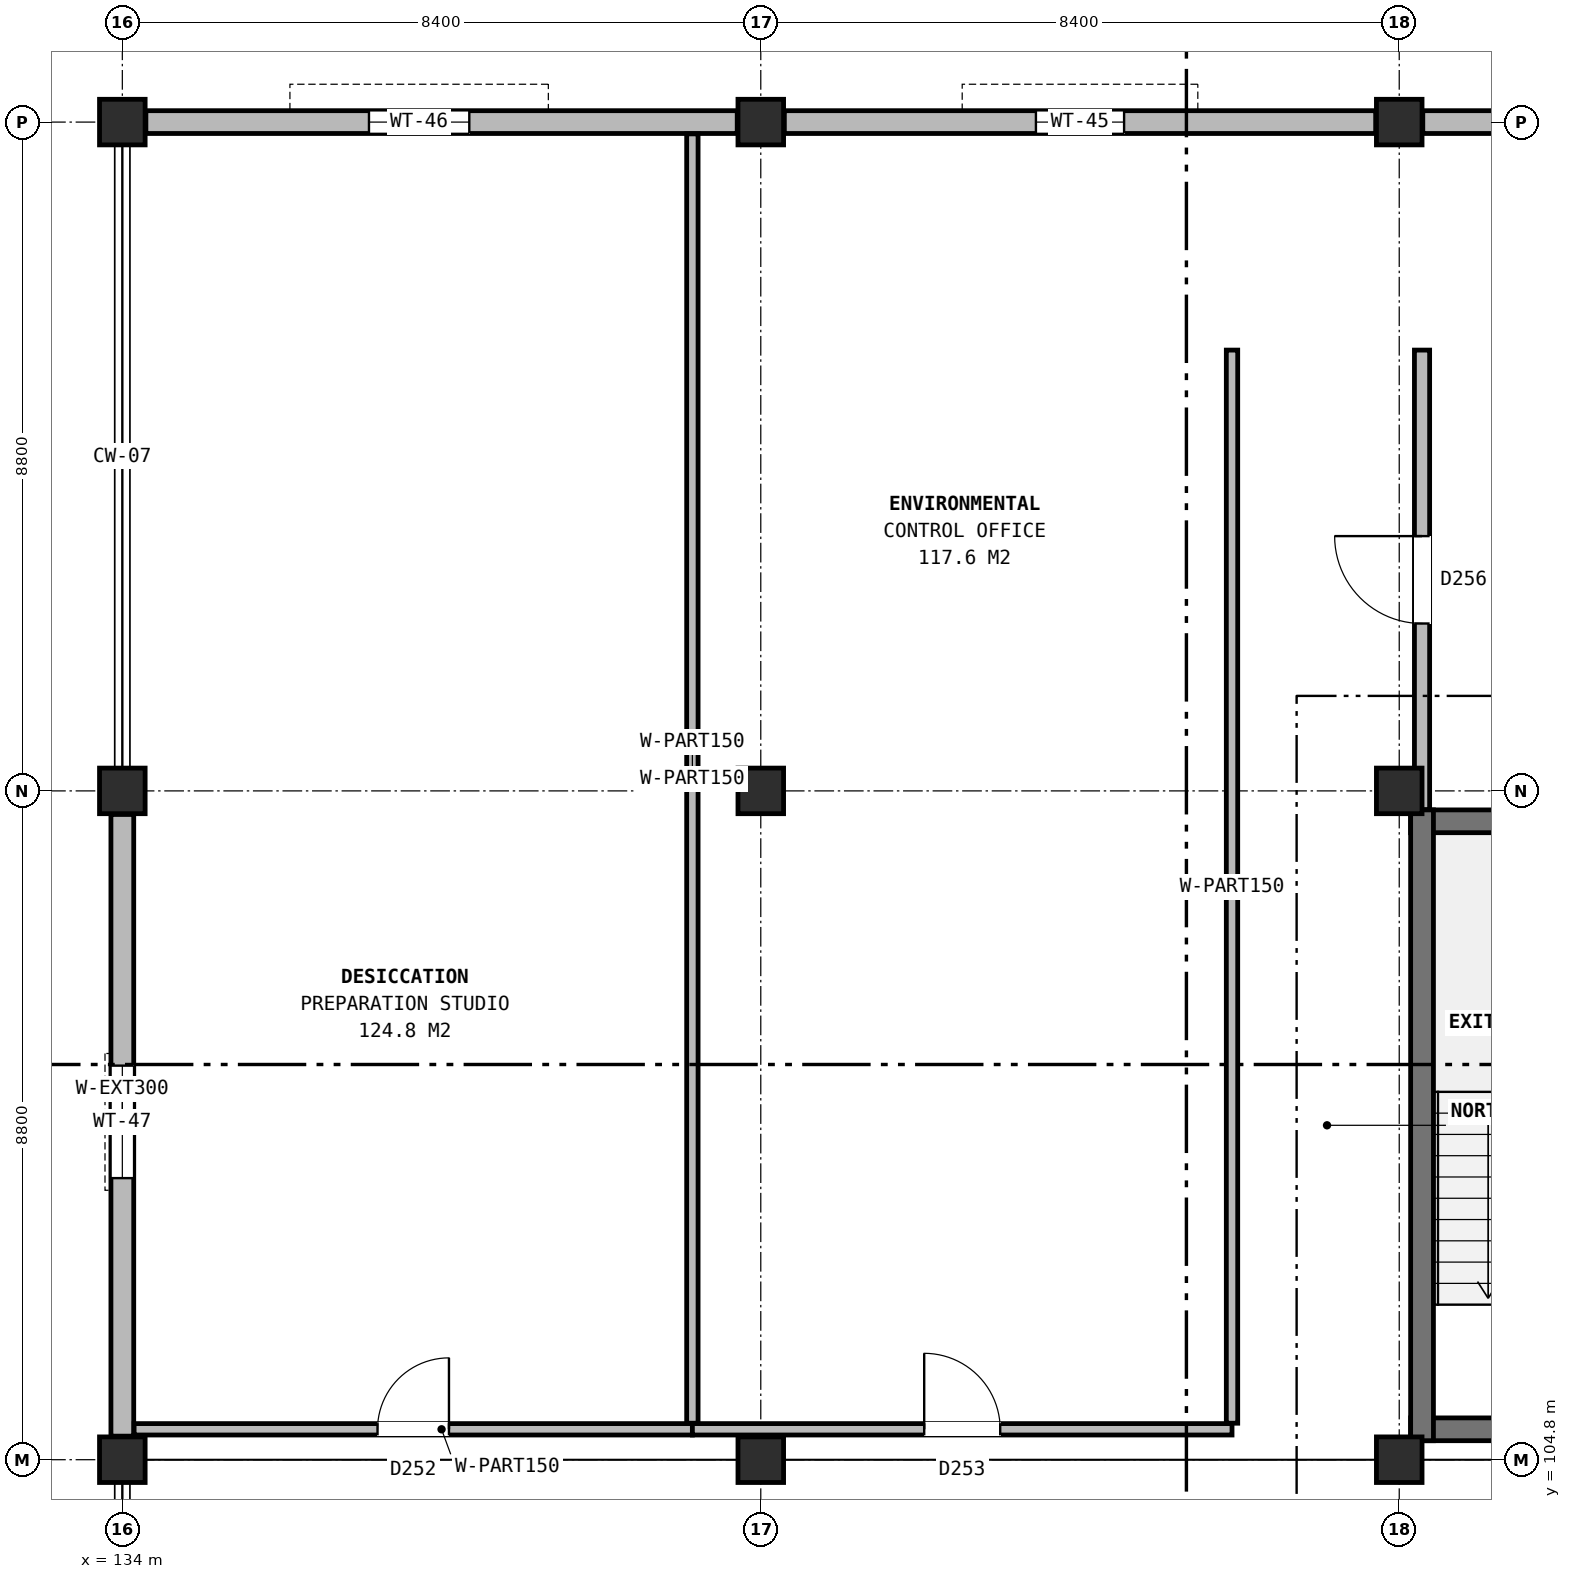
"""IFC4 building model, lengths in metres.
Left out: names, types, materials, properties, quantities, classifications, styles, units other than length and angle.
Written with IfcOpenShell. Run it as: python <this file> out.ifc"""

import sys

from ifc_helpers import new_model, si_unit, direction, frame, frame_2d, origin, origin_2d, place, context, subcontext, project, spatial, rectangle, extrude, element, fill, save


model = new_model("IFC4")
c1 = context("Model", 3, precision=1e-05, world=origin(), true_north=direction((0.0, 1.0)))
c2 = subcontext(c1, "Body", "Model", "MODEL_VIEW")
j1 = project(units=[si_unit("LENGTHUNIT", "METRE"), si_unit("PLANEANGLEUNIT", "RADIAN")], contexts=[c1])
p1 = place(None, origin())
s1 = spatial("IfcSite", under=j1, at=p1, CompositionType="ELEMENT")
p2 = place(p1, origin())
s2 = spatial("IfcBuilding", under=s1, at=p2, CompositionType="ELEMENT")
p3 = place(p2, frame((0.0, 0.0, 44.4)))
s3 = spatial("IfcBuildingStorey", under=s2, at=p3, CompositionType="ELEMENT", Elevation=44.4)
for number, where, z_axis, x_axis in (
    (1, (134.0, 104.8, 0.0), (0.0, 0.0, 1.0), (1.0, 0.0, 0.0)),
    (2, (134.0, 113.6, 0.0), (0.0, 0.0, 1.0), (1.0, 0.0, 0.0)),
    (3, (134.0, 122.4, 0.0), (0.0, 0.0, 1.0), (1.0, 0.0, 0.0)),
    (4, (142.4, 104.8, 0.0), (0.0, 0.0, 1.0), (1.0, 0.0, 0.0)),
    (5, (142.4, 113.6, 0.0), (0.0, 0.0, 1.0), (1.0, 0.0, 0.0)),
    (6, (142.4, 122.4, 0.0), (0.0, 0.0, 1.0), (1.0, 0.0, 0.0)),
    (7, (150.8, 104.8, 0.0), (0.0, 0.0, 1.0), (1.0, 0.0, 0.0)),
    (8, (150.8, 113.6, 0.0), (0.0, 0.0, 1.0), (1.0, 0.0, 0.0)),
    (9, (150.8, 122.4, 0.0), (0.0, 0.0, 1.0), (1.0, 0.0, 0.0)),
):
    element("IfcColumn", number, at=place(p3, frame(where, z_axis=z_axis, x_axis=x_axis)), inside=s3, PredefinedType="COLUMN", context=c2, shape_type="SweptSolid", body=[
        extrude(rectangle(XDim=0.6, YDim=0.6, at=origin_2d()), origin(), (0.0, 0.0, 1.0), 3.8),
    ])
p4 = place(p3, frame((158.89, 122.4, 0.0), z_axis=(0.0, 0.0, 1.0), x_axis=(-1.0, 0.0, 0.0)))
e10 = element("IfcWall", 10, at=p4, inside=s3, PredefinedType="SOLIDWALL", context=c2, shape_type="SweptSolid", body=[
    extrude(rectangle(XDim=7.78, YDim=0.3, at=frame_2d((3.89, 0.0))), origin(), (0.0, 0.0, 1.0), 3.05),
])
p5 = place(p4, frame((2.59, 0.0, 0.9)))
e11 = element("IfcOpeningElement", 11, at=p5, cuts=e10, PredefinedType="OPENING", context=c2, shape_type="SweptSolid", body=[
    extrude(rectangle(XDim=2.6, YDim=2.0, at=frame_2d((1.3, 1.0))), frame((0.0, 0.16, 0.0), z_axis=(0.0, -1.0, 0.0), x_axis=(1.0, 0.0, 0.0)), (0.0, 0.0, 1.0), 0.32),
])
p6 = place(p3, frame((150.49, 122.4, 0.0), z_axis=(0.0, 0.0, 1.0), x_axis=(-1.0, 0.0, 0.0)))
e12 = element("IfcWall", 12, at=p6, inside=s3, PredefinedType="SOLIDWALL", context=c2, shape_type="SweptSolid", body=[
    extrude(rectangle(XDim=7.78, YDim=0.3, at=frame_2d((3.89, 0.0))), origin(), (0.0, 0.0, 1.0), 3.05),
])
p7 = place(p6, frame((3.31, 0.0, 0.9)))
e13 = element("IfcOpeningElement", 13, at=p7, cuts=e12, PredefinedType="OPENING", context=c2, shape_type="SweptSolid", body=[
    extrude(rectangle(XDim=1.16, YDim=1.74, at=frame_2d((0.58, 0.87))), frame((0.0, 0.16, 0.0), z_axis=(0.0, -1.0, 0.0), x_axis=(1.0, 0.0, 0.0)), (0.0, 0.0, 1.0), 0.32),
])
p8 = place(p3, frame((142.09, 122.4, 0.0), z_axis=(0.0, 0.0, 1.0), x_axis=(-1.0, 0.0, 0.0)))
e14 = element("IfcWall", 14, at=p8, inside=s3, PredefinedType="SOLIDWALL", context=c2, shape_type="SweptSolid", body=[
    extrude(rectangle(XDim=7.78, YDim=0.3, at=frame_2d((3.89, 0.0))), origin(), (0.0, 0.0, 1.0), 3.05),
])
p9 = place(p8, frame((3.525, 0.0, 0.9)))
e15 = element("IfcOpeningElement", 15, at=p9, cuts=e14, PredefinedType="OPENING", context=c2, shape_type="SweptSolid", body=[
    extrude(rectangle(XDim=1.32, YDim=1.78, at=frame_2d((0.66, 0.89))), frame((0.0, 0.16, 0.0), z_axis=(0.0, -1.0, 0.0), x_axis=(1.0, 0.0, 0.0)), (0.0, 0.0, 1.0), 0.32),
])
p10 = place(p3, frame((134.0, 113.29, 0.0), z_axis=(0.0, 0.0, 1.0), x_axis=(0.0, -1.0, 0.0)))
e16 = element("IfcWall", 16, at=p10, inside=s3, PredefinedType="SOLIDWALL", context=c2, shape_type="SweptSolid", body=[
    extrude(rectangle(XDim=8.18, YDim=0.3, at=frame_2d((4.09, 0.0))), origin(), (0.0, 0.0, 1.0), 3.05),
])
p11 = place(p10, frame((3.305, 0.0, 0.9)))
e17 = element("IfcOpeningElement", 17, at=p11, cuts=e16, PredefinedType="OPENING", context=c2, shape_type="SweptSolid", body=[
    extrude(rectangle(XDim=1.48, YDim=1.84, at=frame_2d((0.74, 0.92))), frame((0.0, 0.16, 0.0), z_axis=(0.0, -1.0, 0.0), x_axis=(1.0, 0.0, 0.0)), (0.0, 0.0, 1.0), 0.32),
])
for number, where, z_axis, x_axis in (
    (18, (150.95, 105.2, 0.0), (0.0, 0.0, 1.0), (1.0, 0.0, 0.0)),
    (19, (150.95, 113.2, 0.0), (0.0, 0.0, 1.0), (1.0, 0.0, 0.0)),
):
    element("IfcWall", number, at=place(p3, frame(where, z_axis=z_axis, x_axis=x_axis)), inside=s3, PredefinedType="SHEAR", context=c2, shape_type="SweptSolid", body=[
        extrude(rectangle(XDim=3.6, YDim=0.3, at=frame_2d((1.8, 0.0))), origin(), (0.0, 0.0, 1.0), 3.8),
    ])
p12 = place(p3, frame((151.1, 105.05, 0.0), z_axis=(0.0, 0.0, 1.0), x_axis=(0.0, 1.0, 0.0)))
e20 = element("IfcWall", 20, at=p12, inside=s3, PredefinedType="SHEAR", context=c2, shape_type="SweptSolid", body=[
    extrude(rectangle(XDim=8.3, YDim=0.3, at=frame_2d((4.15, 0.0))), origin(), (0.0, 0.0, 1.0), 3.8),
])
p13 = place(p3, frame((134.155, 105.2, 0.0), z_axis=(0.0, 0.0, 1.0), x_axis=(1.0, 0.0, 0.0)))
e21 = element("IfcWall", 21, at=p13, inside=s3, PredefinedType="PARTITIONING", context=c2, shape_type="SweptSolid", body=[
    extrude(rectangle(XDim=7.345, YDim=0.15, at=frame_2d((3.672, 0.0))), origin(), (0.0, 0.0, 1.0), 3.045),
])
p14 = place(p13, frame((3.202, 0.0, 0.0)))
e22 = element("IfcOpeningElement", 22, at=p14, cuts=e21, PredefinedType="OPENING", context=c2, shape_type="SweptSolid", body=[
    extrude(rectangle(XDim=0.94, YDim=2.12, at=frame_2d((0.47, 1.06))), frame((0.0, 0.085, 0.0), z_axis=(0.0, -1.0, 0.0), x_axis=(1.0, 0.0, 0.0)), (0.0, 0.0, 1.0), 0.17),
])
p15 = place(p3, frame((141.5, 105.2, 0.0), z_axis=(0.0, 0.0, 1.0), x_axis=(1.0, 0.0, 0.0)))
e23 = element("IfcWall", 23, at=p15, inside=s3, PredefinedType="PARTITIONING", context=c2, shape_type="SweptSolid", body=[
    extrude(rectangle(XDim=7.1, YDim=0.15, at=frame_2d((3.55, 0.0))), origin(), (0.0, 0.0, 1.0), 3.045),
])
p16 = place(p15, frame((3.05, 0.0, 0.0)))
e24 = element("IfcOpeningElement", 24, at=p16, cuts=e23, PredefinedType="OPENING", context=c2, shape_type="SweptSolid", body=[
    extrude(rectangle(XDim=1.0, YDim=2.16, at=frame_2d((0.5, 1.08))), frame((0.0, 0.085, 0.0), z_axis=(0.0, -1.0, 0.0), x_axis=(1.0, 0.0, 0.0)), (0.0, 0.0, 1.0), 0.17),
])
p17 = place(p3, frame((148.6, 105.28, 0.0), z_axis=(0.0, 0.0, 1.0), x_axis=(0.0, 1.0, 0.0)))
e25 = element("IfcWall", 25, at=p17, inside=s3, PredefinedType="PARTITIONING", context=c2, shape_type="SweptSolid", body=[
    extrude(rectangle(XDim=14.12, YDim=0.15, at=frame_2d((7.06, 0.0))), origin(), (0.0, 0.0, 1.0), 3.465),
])
p18 = place(p3, frame((151.1, 113.355, 0.0), z_axis=(0.0, 0.0, 1.0), x_axis=(0.0, 1.0, 0.0)))
e26 = element("IfcWall", 26, at=p18, inside=s3, PredefinedType="PARTITIONING", context=c2, shape_type="SweptSolid", body=[
    extrude(rectangle(XDim=6.045, YDim=0.2, at=frame_2d((3.022, 0.0))), origin(), (0.0, 0.0, 1.0), 3.045),
])
p19 = place(p18, frame((2.448, 0.0, 0.0)))
e27 = element("IfcOpeningElement", 27, at=p19, cuts=e26, PredefinedType="OPENING", context=c2, shape_type="SweptSolid", body=[
    extrude(rectangle(XDim=1.15, YDim=2.2, at=frame_2d((0.575, 1.1))), frame((0.0, 0.11, 0.0), z_axis=(0.0, -1.0, 0.0), x_axis=(1.0, 0.0, 0.0)), (0.0, 0.0, 1.0), 0.22),
])
p20 = place(p3, frame((141.5, 105.28, 0.0), z_axis=(0.0, 0.0, 1.0), x_axis=(0.0, 1.0, 0.0)))
e28 = element("IfcWall", 28, at=p20, inside=s3, PredefinedType="PARTITIONING", context=c2, shape_type="SweptSolid", body=[
    extrude(rectangle(XDim=16.965, YDim=0.15, at=frame_2d((8.482, 0.0))), origin(), (0.0, 0.0, 1.0), 3.465),
])
p21 = place(p7, origin())
e29 = element("IfcWindow", 29, at=p21, inside=s3, PartitioningType="SINGLE_PANEL", PredefinedType="WINDOW", context=c2, shape_type="SweptSolid", body=[
    extrude(rectangle(XDim=1.16, YDim=1.74, at=frame_2d((0.58, 0.87))), frame((0.0, 0.03, 0.0), z_axis=(0.0, -1.0, 0.0), x_axis=(1.0, 0.0, 0.0)), (0.0, 0.0, 1.0), 0.06),
])
fill(e13, e29)
p22 = place(p9, origin())
e30 = element("IfcWindow", 30, at=p22, inside=s3, PartitioningType="SINGLE_PANEL", PredefinedType="WINDOW", context=c2, shape_type="SweptSolid", body=[
    extrude(rectangle(XDim=1.32, YDim=1.78, at=frame_2d((0.66, 0.89))), frame((0.0, 0.03, 0.0), z_axis=(0.0, -1.0, 0.0), x_axis=(1.0, 0.0, 0.0)), (0.0, 0.0, 1.0), 0.06),
])
fill(e15, e30)
p23 = place(p11, origin())
e31 = element("IfcWindow", 31, at=p23, inside=s3, PartitioningType="SINGLE_PANEL", PredefinedType="WINDOW", context=c2, shape_type="SweptSolid", body=[
    extrude(rectangle(XDim=1.48, YDim=1.84, at=frame_2d((0.74, 0.92))), frame((0.0, 0.03, 0.0), z_axis=(0.0, -1.0, 0.0), x_axis=(1.0, 0.0, 0.0)), (0.0, 0.0, 1.0), 0.06),
])
fill(e17, e31)
p24 = place(p14, origin())
e32 = element("IfcDoor", 32, at=p24, inside=s3, OperationType="SINGLE_SWING_RIGHT", PredefinedType="DOOR", context=c2, shape_type="SweptSolid", body=[
    extrude(rectangle(XDim=0.94, YDim=2.12, at=frame_2d((0.47, 1.06))), frame((0.0, 0.025, 0.0), z_axis=(0.0, -1.0, 0.0), x_axis=(1.0, 0.0, 0.0)), (0.0, 0.0, 1.0), 0.05),
])
fill(e22, e32)
p25 = place(p16, origin())
e33 = element("IfcDoor", 33, at=p25, inside=s3, OperationType="SINGLE_SWING_LEFT", PredefinedType="DOOR", context=c2, shape_type="SweptSolid", body=[
    extrude(rectangle(XDim=1.0, YDim=2.16, at=frame_2d((0.5, 1.08))), frame((0.0, 0.025, 0.0), z_axis=(0.0, -1.0, 0.0), x_axis=(1.0, 0.0, 0.0)), (0.0, 0.0, 1.0), 0.05),
])
fill(e24, e33)
p26 = place(p19, origin())
e34 = element("IfcDoor", 34, at=p26, inside=s3, OperationType="SINGLE_SWING_RIGHT", PredefinedType="DOOR", context=c2, shape_type="SweptSolid", body=[
    extrude(rectangle(XDim=1.15, YDim=2.2, at=frame_2d((0.575, 1.1))), frame((0.0, 0.025, 0.0), z_axis=(0.0, -1.0, 0.0), x_axis=(1.0, 0.0, 0.0)), (0.0, 0.0, 1.0), 0.05),
])
fill(e27, e34)
save(model, sys.argv[1])
